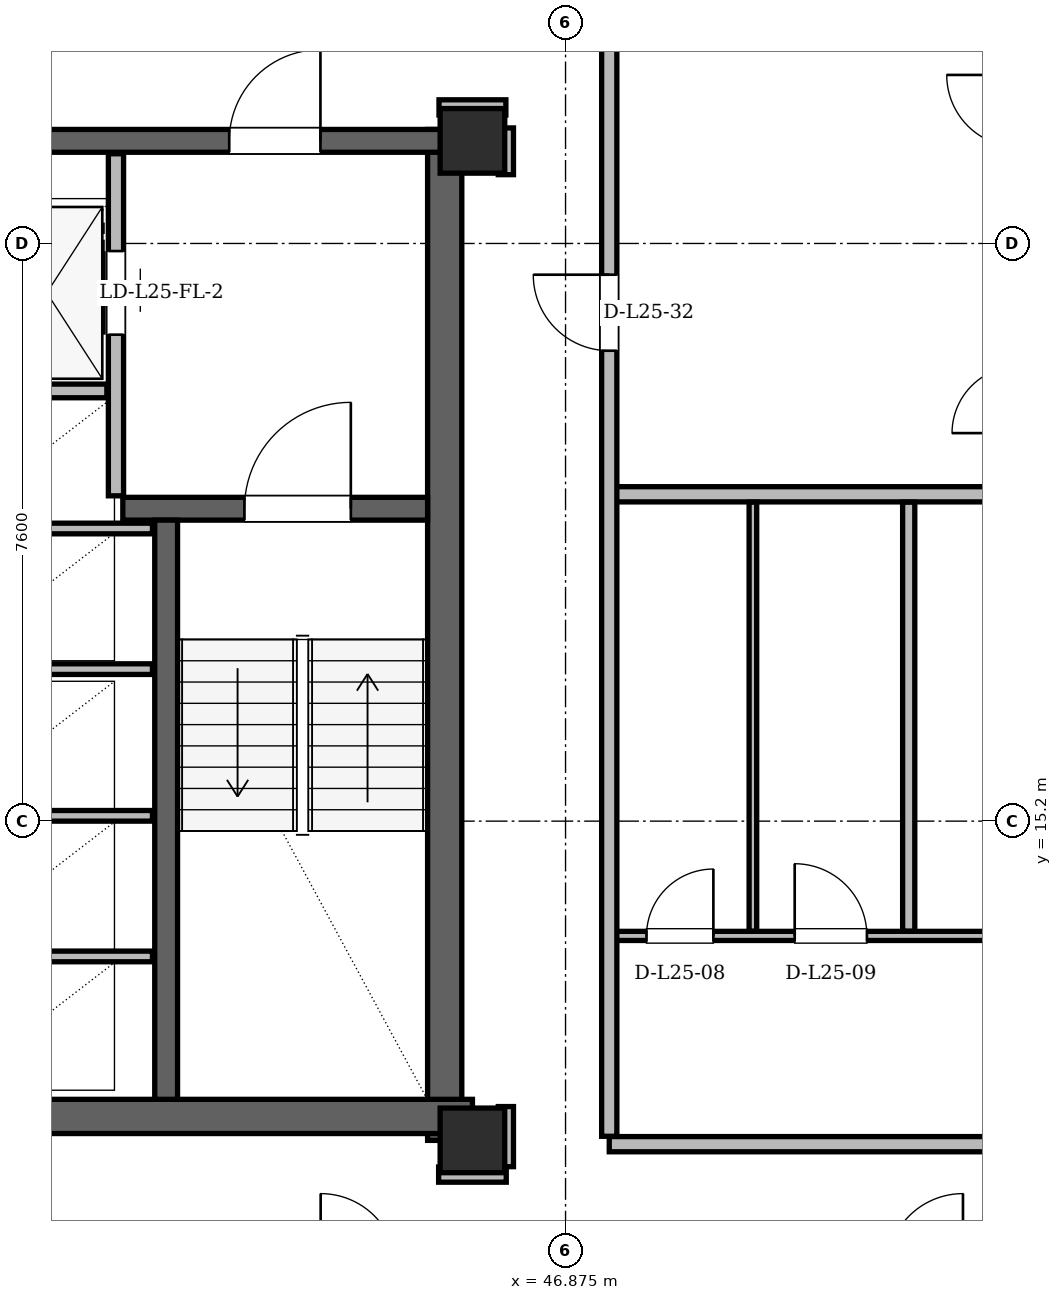
"""IFC4 building model, lengths in metres.
Left out: names, types, materials, properties, quantities, classifications, styles, units other than length and angle.
Written with IfcOpenShell. Run it as: python <this file> out.ifc"""

import sys

from ifc_helpers import new_model, si_unit, direction, frame, frame_2d, origin, origin_2d, place, context, subcontext, project, spatial, rectangle, hollow_rectangle, extrude, element, fill, save


model = new_model("IFC4")
c1 = context("Model", 3, precision=1e-05, world=origin(), true_north=direction((0.0, 1.0)))
c2 = subcontext(c1, "Body", "Model", "MODEL_VIEW")
j1 = project(units=[si_unit("LENGTHUNIT", "METRE"), si_unit("PLANEANGLEUNIT", "RADIAN")], contexts=[c1])
p1 = place(None, origin())
s1 = spatial("IfcSite", under=j1, at=p1, CompositionType="ELEMENT")
p2 = place(p1, origin())
s2 = spatial("IfcBuilding", under=s1, at=p2, CompositionType="ELEMENT")
p3 = place(p2, frame((0.0, 0.0, 96.9)))
s3 = spatial("IfcBuildingStorey", under=s2, at=p3, CompositionType="ELEMENT", Elevation=96.9)
for number, where, z_axis, x_axis in (
    (1, (45.65, 11.0, 0.0), (0.0, 0.0, 1.0), (1.0, 0.0, 0.0)),
    (2, (45.65, 24.15, 0.0), (0.0, 0.0, 1.0), (1.0, 0.0, 0.0)),
):
    element("IfcColumn", number, at=place(p3, frame(where, z_axis=z_axis, x_axis=x_axis)), inside=s3, PredefinedType="COLUMN", context=c2, shape_type="SweptSolid", body=[
        extrude(hollow_rectangle(XDim=0.85, YDim=0.85, WallThickness=0.07, at=origin_2d()), origin(), (0.0, 0.0, 1.0), 3.6),
    ])
p4 = place(p3, frame((45.285, 11.0, 0.0), z_axis=(0.0, 0.0, 1.0), x_axis=(0.0, 1.0, 0.0)))
e3 = element("IfcWall", 3, at=p4, inside=s3, PredefinedType="SHEAR", context=c2, shape_type="SweptSolid", body=[
    extrude(rectangle(XDim=13.3, YDim=0.45, at=frame_2d((6.65, 0.0))), origin(), (0.0, 0.0, 1.0), 3.36),
])
p5 = place(p3, frame((38.55, 11.315, 0.0), z_axis=(0.0, 0.0, 1.0), x_axis=(1.0, 0.0, 0.0)))
e4 = element("IfcWall", 4, at=p5, inside=s3, PredefinedType="SHEAR", context=c2, shape_type="SweptSolid", body=[
    extrude(rectangle(XDim=7.1, YDim=0.45, at=frame_2d((3.55, 0.0))), origin(), (0.0, 0.0, 1.0), 3.36),
])
p6 = place(p3, frame((29.65, 24.15, 0.0), z_axis=(0.0, 0.0, 1.0), x_axis=(1.0, 0.0, 0.0)))
e5 = element("IfcWall", 5, at=p6, inside=s3, PredefinedType="SHEAR", context=c2, shape_type="SweptSolid", body=[
    extrude(rectangle(XDim=15.7, YDim=0.3, at=frame_2d((7.85, 0.0))), origin(), (0.0, 0.0, 1.0), 3.36),
])
p7 = place(p6, frame((1.7, 0.0, 0.0)))
e6 = element("IfcOpeningElement", 6, at=p7, cuts=e5, PredefinedType="OPENING", context=c2, shape_type="SweptSolid", body=[
    extrude(rectangle(XDim=1.2, YDim=2.2, at=frame_2d((0.6, 1.1))), frame((0.0, 0.15, 0.0), z_axis=(0.0, -1.0, 0.0), x_axis=(1.0, 0.0, 0.0)), (0.0, 0.0, 1.0), 0.3),
])
p8 = place(p6, frame((12.8, 0.0, 0.0)))
e7 = element("IfcOpeningElement", 7, at=p8, cuts=e5, PredefinedType="OPENING", context=c2, shape_type="SweptSolid", body=[
    extrude(rectangle(XDim=1.2, YDim=2.2, at=frame_2d((0.6, 1.1))), frame((0.0, 0.15, 0.0), z_axis=(0.0, -1.0, 0.0), x_axis=(1.0, 0.0, 0.0)), (0.0, 0.0, 1.0), 0.3),
])
p9 = place(p6, frame((6.55, 0.0, 0.0)))
e8 = element("IfcOpeningElement", 8, at=p9, cuts=e5, PredefinedType="OPENING", context=c2, shape_type="SweptSolid", body=[
    extrude(rectangle(XDim=0.9, YDim=2.05, at=frame_2d((0.45, 1.025))), frame((0.0, 0.15, 0.0), z_axis=(0.0, -1.0, 0.0), x_axis=(1.0, 0.0, 0.0)), (0.0, 0.0, 1.0), 0.3),
])
p10 = place(p6, frame((8.45, 0.0, 0.0)))
e9 = element("IfcOpeningElement", 9, at=p10, cuts=e5, PredefinedType="OPENING", context=c2, shape_type="SweptSolid", body=[
    extrude(rectangle(XDim=0.9, YDim=2.05, at=frame_2d((0.45, 1.025))), frame((0.0, 0.15, 0.0), z_axis=(0.0, -1.0, 0.0), x_axis=(1.0, 0.0, 0.0)), (0.0, 0.0, 1.0), 0.3),
])
p11 = place(p3, frame((41.05, 19.31, 0.0), z_axis=(0.0, 0.0, 1.0), x_axis=(1.0, 0.0, 0.0)))
e10 = element("IfcWall", 10, at=p11, inside=s3, PredefinedType="SHEAR", context=c2, shape_type="SweptSolid", body=[
    extrude(rectangle(XDim=4.01, YDim=0.3, at=frame_2d((2.005, 0.0))), origin(), (0.0, 0.0, 1.0), 3.36),
])
p12 = place(p11, frame((1.6, 0.0, 0.0)))
e11 = element("IfcOpeningElement", 11, at=p12, cuts=e10, PredefinedType="OPENING", context=c2, shape_type="SweptSolid", body=[
    extrude(rectangle(XDim=1.4, YDim=2.2, at=frame_2d((0.7, 1.1))), frame((0.0, 0.15, 0.0), z_axis=(0.0, -1.0, 0.0), x_axis=(1.0, 0.0, 0.0)), (0.0, 0.0, 1.0), 0.3),
])
p13 = place(p3, frame((41.62, 11.54, 0.0), z_axis=(0.0, 0.0, 1.0), x_axis=(0.0, 1.0, 0.0)))
e12 = element("IfcWall", 12, at=p13, inside=s3, PredefinedType="SHEAR", context=c2, shape_type="SweptSolid", body=[
    extrude(rectangle(XDim=7.62, YDim=0.3, at=frame_2d((3.81, 0.0))), origin(), (0.0, 0.0, 1.0), 3.36),
])
p14 = place(p3, frame((60.746, 13.639, 0.0), z_axis=(0.0, 0.0, 1.0), x_axis=(-0.499995749028, 0.86602785807, 0.0)))
e13 = element("IfcWall", 13, at=p14, inside=s3, PredefinedType="SOLIDWALL", context=c2, shape_type="SweptSolid", body=[
    extrude(rectangle(XDim=34.437, YDim=0.34, at=frame_2d((17.218, 0.0))), origin(), (0.0, 0.0, 1.0), 2.578),
])
p15 = place(p14, frame((3.01, 0.0, 0.0)))
e14 = element("IfcOpeningElement", 14, at=p15, cuts=e13, PredefinedType="OPENING", context=c2, shape_type="SweptSolid", body=[
    extrude(rectangle(XDim=1.5, YDim=2.2, at=frame_2d((0.75, 1.1))), frame((0.0, 0.17, 0.0), z_axis=(0.0, -1.0, 0.0), x_axis=(1.0, 0.0, 0.0)), (0.0, 0.0, 1.0), 0.34),
])
p16 = place(p14, frame((26.162, 0.0, 0.0)))
e15 = element("IfcOpeningElement", 15, at=p16, cuts=e13, PredefinedType="OPENING", context=c2, shape_type="SweptSolid", body=[
    extrude(rectangle(XDim=1.5, YDim=2.2, at=frame_2d((0.75, 1.1))), frame((0.0, 0.17, 0.0), z_axis=(0.0, -1.0, 0.0), x_axis=(1.0, 0.0, 0.0)), (0.0, 0.0, 1.0), 0.34),
])
p17 = place(p14, frame((0.966, 0.0, 0.85)))
e16 = element("IfcOpeningElement", 16, at=p17, cuts=e13, PredefinedType="OPENING", context=c2, shape_type="SweptSolid", body=[
    extrude(rectangle(XDim=1.2, YDim=1.48, at=frame_2d((0.6, 0.74))), frame((0.0, 0.17, 0.0), z_axis=(0.0, -1.0, 0.0), x_axis=(1.0, 0.0, 0.0)), (0.0, 0.0, 1.0), 0.34),
])
p18 = place(p14, frame((16.893, 0.0, 0.85)))
e17 = element("IfcOpeningElement", 17, at=p18, cuts=e13, PredefinedType="OPENING", context=c2, shape_type="SweptSolid", body=[
    extrude(rectangle(XDim=1.6, YDim=1.618, at=frame_2d((0.8, 0.809))), frame((0.0, 0.17, 0.0), z_axis=(0.0, -1.0, 0.0), x_axis=(1.0, 0.0, 0.0)), (0.0, 0.0, 1.0), 0.34),
])
p19 = place(p14, frame((21.524, 0.0, 0.85)))
e18 = element("IfcOpeningElement", 18, at=p19, cuts=e13, PredefinedType="OPENING", context=c2, shape_type="SweptSolid", body=[
    extrude(rectangle(XDim=1.2, YDim=1.48, at=frame_2d((0.6, 0.74))), frame((0.0, 0.17, 0.0), z_axis=(0.0, -1.0, 0.0), x_axis=(1.0, 0.0, 0.0)), (0.0, 0.0, 1.0), 0.34),
])
p20 = place(p14, frame((13.377, 0.0, 0.85)))
e19 = element("IfcOpeningElement", 19, at=p20, cuts=e13, PredefinedType="OPENING", context=c2, shape_type="SweptSolid", body=[
    extrude(rectangle(XDim=1.2, YDim=1.48, at=frame_2d((0.6, 0.74))), frame((0.0, 0.17, 0.0), z_axis=(0.0, -1.0, 0.0), x_axis=(1.0, 0.0, 0.0)), (0.0, 0.0, 1.0), 0.34),
])
p21 = place(p14, frame((30.824, 0.0, 0.85)))
e20 = element("IfcOpeningElement", 20, at=p21, cuts=e13, PredefinedType="OPENING", context=c2, shape_type="SweptSolid", body=[
    extrude(rectangle(XDim=2.6, YDim=1.618, at=frame_2d((1.3, 0.809))), frame((0.0, 0.17, 0.0), z_axis=(0.0, -1.0, 0.0), x_axis=(1.0, 0.0, 0.0)), (0.0, 0.0, 1.0), 0.34),
])
p22 = place(p3, frame((40.96, 19.48, 0.0), z_axis=(0.0, 0.0, 1.0), x_axis=(0.0, 1.0, 0.0)))
e21 = element("IfcWall", 21, at=p22, inside=s3, PredefinedType="PARTITIONING", context=c2, shape_type="SweptSolid", body=[
    extrude(rectangle(XDim=4.5, YDim=0.2, at=frame_2d((2.25, 0.0))), origin(), (0.0, 0.0, 1.0), 2.4),
])
p23 = place(p22, frame((2.12, 0.0, 0.0)))
e22 = element("IfcOpeningElement", 22, at=p23, cuts=e21, PredefinedType="OPENING", context=c2, shape_type="SweptSolid", body=[
    extrude(rectangle(XDim=1.1, YDim=2.2, at=frame_2d((0.55, 1.1))), frame((0.0, 0.1, 0.0), z_axis=(0.0, -1.0, 0.0), x_axis=(1.0, 0.0, 0.0)), (0.0, 0.0, 1.0), 0.2),
])
p24 = place(p3, frame((39.26, 20.86, 0.0), z_axis=(0.0, 0.0, 1.0), x_axis=(1.0, 0.0, 0.0)))
e23 = element("IfcWall", 23, at=p24, inside=s3, PredefinedType="PARTITIONING", context=c2, shape_type="SweptSolid", body=[
    extrude(rectangle(XDim=1.58, YDim=0.18, at=frame_2d((0.79, 0.0))), origin(), (0.0, 0.0, 1.0), 3.36),
])
for number, where, z_axis, x_axis in (
    (24, (38.78, 13.42, 0.0), (0.0, 0.0, 1.0), (1.0, 0.0, 0.0)),
    (25, (38.78, 15.27, 0.0), (0.0, 0.0, 1.0), (1.0, 0.0, 0.0)),
    (26, (38.78, 17.2, 0.0), (0.0, 0.0, 1.0), (1.0, 0.0, 0.0)),
    (27, (38.78, 19.05, 0.0), (0.0, 0.0, 1.0), (1.0, 0.0, 0.0)),
):
    element("IfcWall", number, at=place(p3, frame(where, z_axis=z_axis, x_axis=x_axis)), inside=s3, PredefinedType="PARTITIONING", context=c2, shape_type="SweptSolid", body=[
        extrude(rectangle(XDim=2.66, YDim=0.14, at=frame_2d((1.33, 0.0))), origin(), (0.0, 0.0, 1.0), 3.36),
    ])
p25 = place(p3, frame((45.205, 10.55, 0.0), z_axis=(0.0, 0.0, 1.0), x_axis=(1.0, 0.0, 0.0)))
e28 = element("IfcWall", 28, at=p25, inside=s3, PredefinedType="PARTITIONING", context=c2, shape_type="SweptSolid", body=[
    extrude(rectangle(XDim=0.89, YDim=0.2, at=frame_2d((0.445, 0.0))), origin(), (0.0, 0.0, 1.0), 3.36),
])
p26 = place(p3, frame((47.45, 10.95, 0.0), z_axis=(0.0, 0.0, 1.0), x_axis=(1.0, 0.0, 0.0)))
e29 = element("IfcWall", 29, at=p26, inside=s3, PredefinedType="PARTITIONING", context=c2, shape_type="SweptSolid", body=[
    extrude(rectangle(XDim=8.35, YDim=0.2, at=frame_2d((4.175, 0.0))), origin(), (0.0, 0.0, 1.0), 3.36),
])
p27 = place(p3, frame((47.4, 13.69, 0.0), z_axis=(0.0, 0.0, 1.0), x_axis=(1.0, 0.0, 0.0)))
e30 = element("IfcWall", 30, at=p27, inside=s3, PredefinedType="PARTITIONING", context=c2, shape_type="SweptSolid", body=[
    extrude(rectangle(XDim=12.953, YDim=0.12, at=frame_2d((6.477, 0.0))), origin(), (0.0, 0.0, 1.0), 3.36),
])
p28 = place(p27, frame((0.54, 0.0, 0.0)))
e31 = element("IfcOpeningElement", 31, at=p28, cuts=e30, PredefinedType="OPENING", context=c2, shape_type="SweptSolid", body=[
    extrude(rectangle(XDim=0.88, YDim=2.08, at=frame_2d((0.44, 1.04))), frame((0.0, 0.06, 0.0), z_axis=(0.0, -1.0, 0.0), x_axis=(1.0, 0.0, 0.0)), (0.0, 0.0, 1.0), 0.12),
])
p29 = place(p27, frame((2.49, 0.0, 0.0)))
e32 = element("IfcOpeningElement", 32, at=p29, cuts=e30, PredefinedType="OPENING", context=c2, shape_type="SweptSolid", body=[
    extrude(rectangle(XDim=0.95, YDim=2.1, at=frame_2d((0.475, 1.05))), frame((0.0, 0.06, 0.0), z_axis=(0.0, -1.0, 0.0), x_axis=(1.0, 0.0, 0.0)), (0.0, 0.0, 1.0), 0.12),
])
p30 = place(p27, frame((8.123, 0.0, 0.0)))
e33 = element("IfcOpeningElement", 33, at=p30, cuts=e30, PredefinedType="OPENING", context=c2, shape_type="SweptSolid", body=[
    extrude(rectangle(XDim=0.92, YDim=2.12, at=frame_2d((0.46, 1.06))), frame((0.0, 0.06, 0.0), z_axis=(0.0, -1.0, 0.0), x_axis=(1.0, 0.0, 0.0)), (0.0, 0.0, 1.0), 0.12),
])
p31 = place(p3, frame((47.45, 19.5, 0.0), z_axis=(0.0, 0.0, 1.0), x_axis=(1.0, 0.0, 0.0)))
e34 = element("IfcWall", 34, at=p31, inside=s3, PredefinedType="PARTITIONING", context=c2, shape_type="SweptSolid", body=[
    extrude(rectangle(XDim=9.712, YDim=0.2, at=frame_2d((4.856, 0.0))), origin(), (0.0, 0.0, 1.0), 3.36),
])
p32 = place(p3, frame((45.21, 24.59, 0.0), z_axis=(0.0, 0.0, 1.0), x_axis=(1.0, 0.0, 0.0)))
e35 = element("IfcWall", 35, at=p32, inside=s3, PredefinedType="PARTITIONING", context=c2, shape_type="SweptSolid", body=[
    extrude(rectangle(XDim=0.88, YDim=0.2, at=frame_2d((0.44, 0.0))), origin(), (0.0, 0.0, 1.0), 2.814),
])
p33 = place(p3, frame((46.09, 10.654, 0.0), z_axis=(0.0, 0.0, 1.0), x_axis=(0.0, 1.0, 0.0)))
e36 = element("IfcWall", 36, at=p33, inside=s3, PredefinedType="PARTITIONING", context=c2, shape_type="SweptSolid", body=[
    extrude(rectangle(XDim=0.791, YDim=0.2, at=frame_2d((0.396, 0.0))), origin(), (0.0, 0.0, 1.0), 2.814),
])
p34 = place(p3, frame((46.09, 23.705, 0.0), z_axis=(0.0, 0.0, 1.0), x_axis=(0.0, 1.0, 0.0)))
e37 = element("IfcWall", 37, at=p34, inside=s3, PredefinedType="PARTITIONING", context=c2, shape_type="SweptSolid", body=[
    extrude(rectangle(XDim=0.615, YDim=0.2, at=frame_2d((0.308, 0.0))), origin(), (0.0, 0.0, 1.0), 2.946),
])
p35 = place(p3, frame((47.45, 11.054, 0.0), z_axis=(0.0, 0.0, 1.0), x_axis=(0.0, 1.0, 0.0)))
e38 = element("IfcWall", 38, at=p35, inside=s3, PredefinedType="PARTITIONING", context=c2, shape_type="SweptSolid", body=[
    extrude(rectangle(XDim=25.267, YDim=0.2, at=frame_2d((12.633, 0.0))), origin(), (0.0, 0.0, 1.0), 2.578),
])
p36 = place(p35, frame((10.335, 0.0, 0.0)))
e39 = element("IfcOpeningElement", 39, at=p36, cuts=e38, PredefinedType="OPENING", context=c2, shape_type="SweptSolid", body=[
    extrude(rectangle(XDim=1.0, YDim=2.18, at=frame_2d((0.5, 1.09))), frame((0.0, 0.1, 0.0), z_axis=(0.0, -1.0, 0.0), x_axis=(1.0, 0.0, 0.0)), (0.0, 0.0, 1.0), 0.2),
])
p37 = place(p3, frame((49.34, 13.754, 0.0), z_axis=(0.0, 0.0, 1.0), x_axis=(0.0, 1.0, 0.0)))
e40 = element("IfcWall", 40, at=p37, inside=s3, PredefinedType="PARTITIONING", context=c2, shape_type="SweptSolid", body=[
    extrude(rectangle(XDim=5.642, YDim=0.1, at=frame_2d((2.821, 0.0))), origin(), (0.0, 0.0, 1.0), 3.36),
])
p38 = place(p3, frame((51.39, 13.754, 0.0), z_axis=(0.0, 0.0, 1.0), x_axis=(0.0, 1.0, 0.0)))
e41 = element("IfcWall", 41, at=p38, inside=s3, PredefinedType="PARTITIONING", context=c2, shape_type="SweptSolid", body=[
    extrude(rectangle(XDim=5.642, YDim=0.16, at=frame_2d((2.821, 0.0))), origin(), (0.0, 0.0, 1.0), 2.946),
])
p39 = place(p23, origin())
e42 = element("IfcDoor", 42, at=p39, inside=s3, OperationType="SLIDING_TO_RIGHT", PredefinedType="DOOR", context=c2, shape_type="SweptSolid", body=[
    extrude(rectangle(XDim=1.1, YDim=2.2, at=frame_2d((0.55, 1.1))), frame((0.0, 0.025, 0.0), z_axis=(0.0, -1.0, 0.0), x_axis=(1.0, 0.0, 0.0)), (0.0, 0.0, 1.0), 0.05),
])
fill(e22, e42)
p40 = place(p12, origin())
e43 = element("IfcDoor", 43, at=p40, inside=s3, OperationType="SINGLE_SWING_RIGHT", PredefinedType="DOOR", context=c2, shape_type="SweptSolid", body=[
    extrude(rectangle(XDim=1.4, YDim=2.2, at=frame_2d((0.7, 1.1))), frame((0.0, 0.025, 0.0), z_axis=(0.0, -1.0, 0.0), x_axis=(1.0, 0.0, 0.0)), (0.0, 0.0, 1.0), 0.05),
])
fill(e11, e43)
p41 = place(p8, origin())
e44 = element("IfcDoor", 44, at=p41, inside=s3, OperationType="SINGLE_SWING_RIGHT", PredefinedType="DOOR", context=c2, shape_type="SweptSolid", body=[
    extrude(rectangle(XDim=1.2, YDim=2.2, at=frame_2d((0.6, 1.1))), frame((0.0, 0.025, 0.0), z_axis=(0.0, -1.0, 0.0), x_axis=(1.0, 0.0, 0.0)), (0.0, 0.0, 1.0), 0.05),
])
fill(e7, e44)
p42 = place(p28, origin())
e45 = element("IfcDoor", 45, at=p42, inside=s3, OperationType="SINGLE_SWING_RIGHT", PredefinedType="DOOR", context=c2, shape_type="SweptSolid", body=[
    extrude(rectangle(XDim=0.88, YDim=2.08, at=frame_2d((0.44, 1.04))), frame((0.0, 0.025, 0.0), z_axis=(0.0, -1.0, 0.0), x_axis=(1.0, 0.0, 0.0)), (0.0, 0.0, 1.0), 0.05),
])
fill(e31, e45)
p43 = place(p29, origin())
e46 = element("IfcDoor", 46, at=p43, inside=s3, OperationType="SINGLE_SWING_LEFT", PredefinedType="DOOR", context=c2, shape_type="SweptSolid", body=[
    extrude(rectangle(XDim=0.95, YDim=2.1, at=frame_2d((0.475, 1.05))), frame((0.0, 0.025, 0.0), z_axis=(0.0, -1.0, 0.0), x_axis=(1.0, 0.0, 0.0)), (0.0, 0.0, 1.0), 0.05),
])
fill(e32, e46)
p44 = place(p36, origin())
e47 = element("IfcDoor", 47, at=p44, inside=s3, OperationType="SINGLE_SWING_RIGHT", PredefinedType="DOOR", context=c2, shape_type="SweptSolid", body=[
    extrude(rectangle(XDim=1.0, YDim=2.18, at=frame_2d((0.5, 1.09))), frame((0.0, 0.025, 0.0), z_axis=(0.0, -1.0, 0.0), x_axis=(1.0, 0.0, 0.0)), (0.0, 0.0, 1.0), 0.05),
])
fill(e39, e47)
save(model, sys.argv[1])
